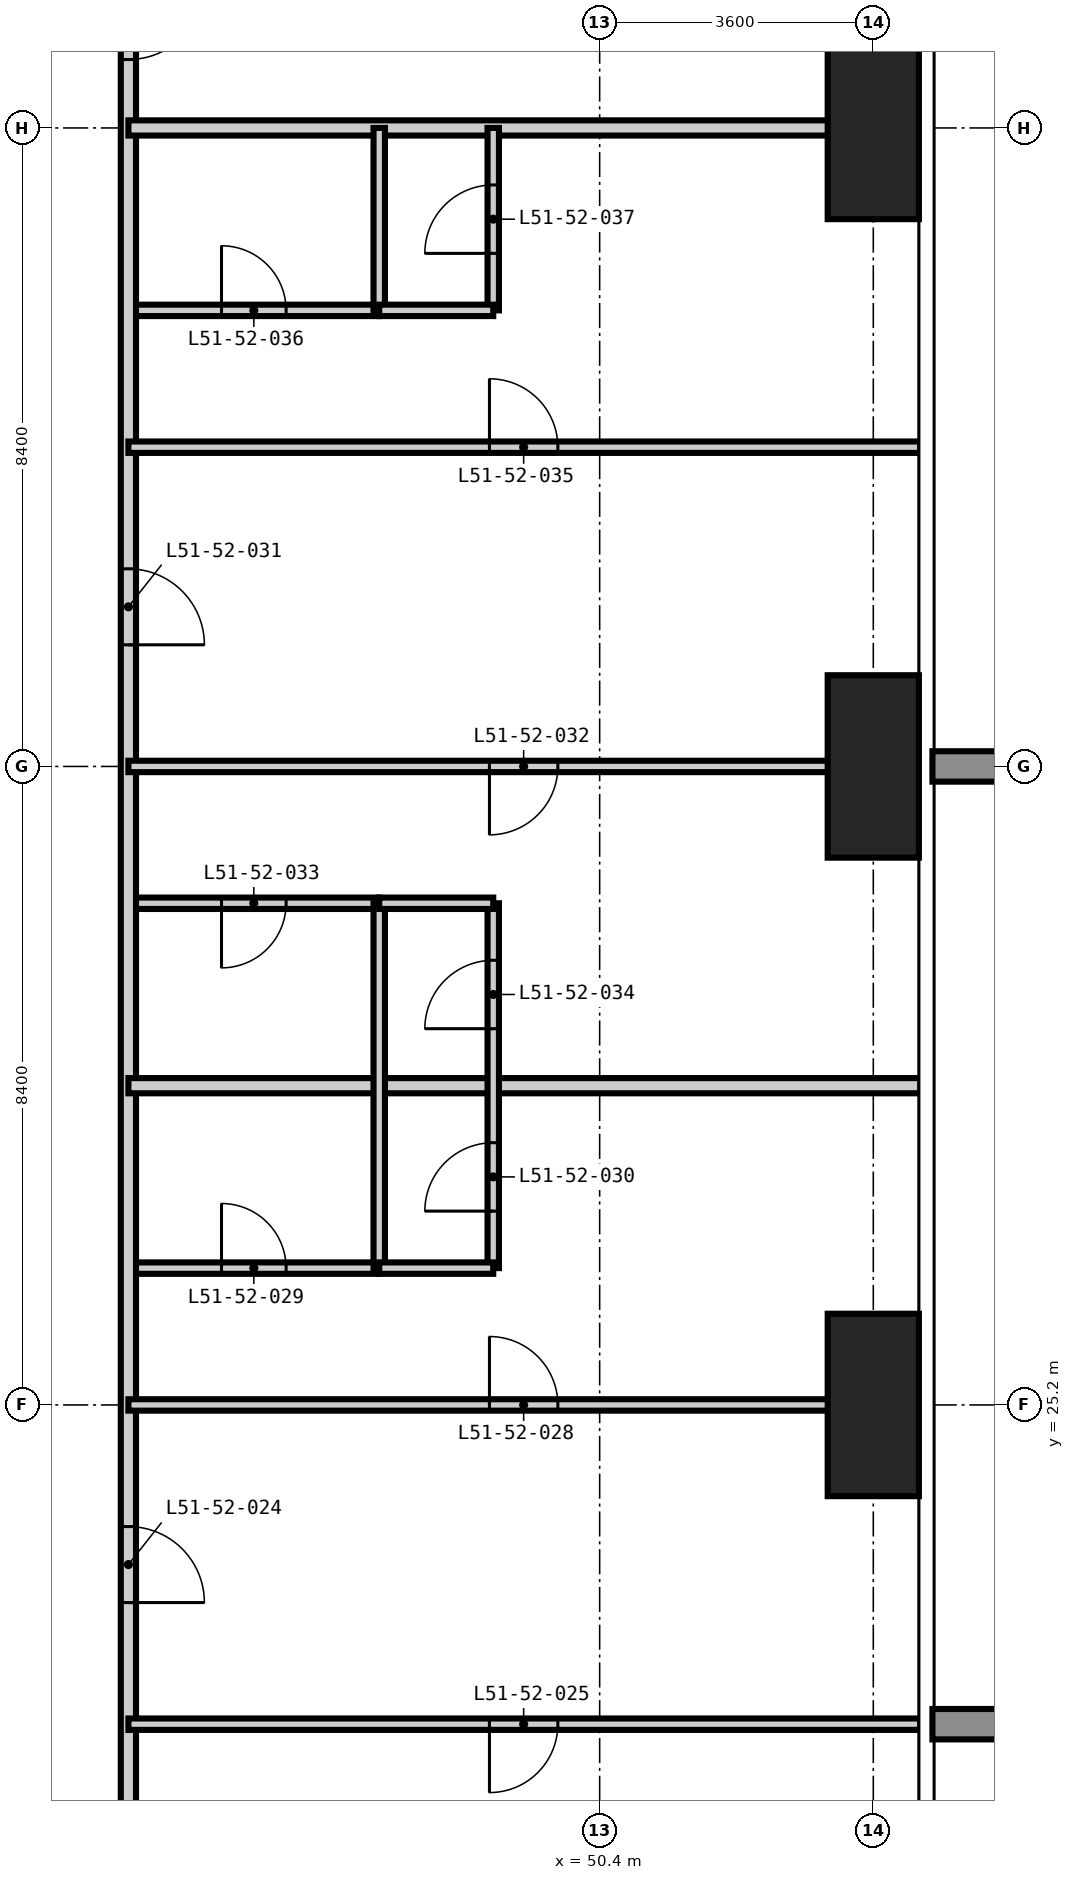
"""IFC4 building model, lengths in metres.
Left out: names, types, materials, properties, quantities, classifications, styles, units other than length and angle.
Written with IfcOpenShell. Run it as: python <this file> out.ifc"""

import sys

from ifc_helpers import new_model, si_unit, direction, frame, frame_2d, origin, origin_2d, place, context, subcontext, project, spatial, rectangle, extrude, element, fill, save


model = new_model("IFC4")
c1 = context("Model", 3, precision=1e-05, world=origin(), true_north=direction((0.0, 1.0)))
c2 = subcontext(c1, "Body", "Model", "MODEL_VIEW")
j1 = project(units=[si_unit("LENGTHUNIT", "METRE"), si_unit("PLANEANGLEUNIT", "RADIAN")], contexts=[c1])
p1 = place(None, origin())
s1 = spatial("IfcSite", under=j1, at=p1, CompositionType="ELEMENT")
p2 = place(p1, origin())
s2 = spatial("IfcBuilding", under=s1, at=p2, CompositionType="ELEMENT")
p3 = place(p2, frame((0.0, 0.0, 198.6)))
s3 = spatial("IfcBuildingStorey", under=s2, at=p3, CompositionType="ELEMENT", Elevation=198.6)
for number, where, z_axis, x_axis in (
    (1, (54.0, 25.2, -0.35), (0.0, 0.0, 1.0), (1.0, 0.0, 0.0)),
    (2, (54.0, 33.6, -0.35), (0.0, 0.0, 1.0), (1.0, 0.0, 0.0)),
    (3, (54.0, 42.0, -0.35), (0.0, 0.0, 1.0), (1.0, 0.0, 0.0)),
):
    element("IfcColumn", number, at=place(p3, frame(where, z_axis=z_axis, x_axis=x_axis)), inside=s3, PredefinedType="COLUMN", context=c2, shape_type="SweptSolid", body=[
        extrude(rectangle(XDim=1.2, YDim=2.4, at=origin_2d()), origin(), (0.0, 0.0, 1.0), 3.6),
    ])
p4 = place(p3, frame((44.2, 27.0, 0.0), z_axis=(0.0, 0.0, 1.0), x_axis=(1.0, 0.0, 0.0)))
e4 = element("IfcWall", 4, at=p4, inside=s3, PredefinedType="PARTITIONING", context=c2, shape_type="SweptSolid", body=[
    extrude(rectangle(XDim=3.3, YDim=0.15, at=frame_2d((1.65, 0.0))), origin(), (0.0, 0.0, 1.0), 3.25),
])
p5 = place(p4, frame((1.225, 0.0, 0.0)))
e5 = element("IfcOpeningElement", 5, at=p5, cuts=e4, PredefinedType="OPENING", context=c2, shape_type="SweptSolid", body=[
    extrude(rectangle(XDim=0.85, YDim=2.1, at=frame_2d((0.425, 1.05))), frame((0.0, 0.085, 0.0), z_axis=(0.0, -1.0, 0.0), x_axis=(1.0, 0.0, 0.0)), (0.0, 0.0, 1.0), 0.17),
])
p6 = place(p3, frame((44.2, 31.8, 0.0), z_axis=(0.0, 0.0, 1.0), x_axis=(1.0, 0.0, 0.0)))
e6 = element("IfcWall", 6, at=p6, inside=s3, PredefinedType="PARTITIONING", context=c2, shape_type="SweptSolid", body=[
    extrude(rectangle(XDim=3.3, YDim=0.15, at=frame_2d((1.65, 0.0))), origin(), (0.0, 0.0, 1.0), 3.25),
])
p7 = place(p6, frame((1.225, 0.0, 0.0)))
e7 = element("IfcOpeningElement", 7, at=p7, cuts=e6, PredefinedType="OPENING", context=c2, shape_type="SweptSolid", body=[
    extrude(rectangle(XDim=0.85, YDim=2.1, at=frame_2d((0.425, 1.05))), frame((0.0, 0.085, 0.0), z_axis=(0.0, -1.0, 0.0), x_axis=(1.0, 0.0, 0.0)), (0.0, 0.0, 1.0), 0.17),
])
p8 = place(p3, frame((44.2, 39.6, 0.0), z_axis=(0.0, 0.0, 1.0), x_axis=(1.0, 0.0, 0.0)))
e8 = element("IfcWall", 8, at=p8, inside=s3, PredefinedType="PARTITIONING", context=c2, shape_type="SweptSolid", body=[
    extrude(rectangle(XDim=3.3, YDim=0.15, at=frame_2d((1.65, 0.0))), origin(), (0.0, 0.0, 1.0), 3.25),
])
p9 = place(p8, frame((1.225, 0.0, 0.0)))
e9 = element("IfcOpeningElement", 9, at=p9, cuts=e8, PredefinedType="OPENING", context=c2, shape_type="SweptSolid", body=[
    extrude(rectangle(XDim=0.85, YDim=2.1, at=frame_2d((0.425, 1.05))), frame((0.0, 0.085, 0.0), z_axis=(0.0, -1.0, 0.0), x_axis=(1.0, 0.0, 0.0)), (0.0, 0.0, 1.0), 0.17),
])
p10 = place(p3, frame((44.2, 44.8, 0.0), z_axis=(0.0, 0.0, 1.0), x_axis=(0.0, -1.0, 0.0)))
e10 = element("IfcWall", 10, at=p10, inside=s3, PredefinedType="PARTITIONING", context=c2, shape_type="SweptSolid", body=[
    extrude(rectangle(XDim=31.4, YDim=0.2, at=frame_2d((15.7, 0.0))), origin(), (0.0, 0.0, 1.0), 3.25),
])
p11 = place(p10, frame((21.2, 0.0, 0.0)))
e11 = element("IfcOpeningElement", 11, at=p11, cuts=e10, PredefinedType="OPENING", context=c2, shape_type="SweptSolid", body=[
    extrude(rectangle(XDim=1.0, YDim=2.2, at=frame_2d((0.5, 1.1))), frame((0.0, 0.11, 0.0), z_axis=(0.0, -1.0, 0.0), x_axis=(1.0, 0.0, 0.0)), (0.0, 0.0, 1.0), 0.22),
])
p12 = place(p10, frame((8.6, 0.0, 0.0)))
e12 = element("IfcOpeningElement", 12, at=p12, cuts=e10, PredefinedType="OPENING", context=c2, shape_type="SweptSolid", body=[
    extrude(rectangle(XDim=1.0, YDim=2.2, at=frame_2d((0.5, 1.1))), frame((0.0, 0.11, 0.0), z_axis=(0.0, -1.0, 0.0), x_axis=(1.0, 0.0, 0.0)), (0.0, 0.0, 1.0), 0.22),
])
p13 = place(p10, frame((29.2, 0.0, 0.0)))
e13 = element("IfcOpeningElement", 13, at=p13, cuts=e10, PredefinedType="OPENING", context=c2, shape_type="SweptSolid", body=[
    extrude(rectangle(XDim=1.0, YDim=2.2, at=frame_2d((0.5, 1.1))), frame((0.0, 0.11, 0.0), z_axis=(0.0, -1.0, 0.0), x_axis=(1.0, 0.0, 0.0)), (0.0, 0.0, 1.0), 0.22),
])
p14 = place(p10, frame((0.9, 0.0, 0.0)))
e14 = element("IfcOpeningElement", 14, at=p14, cuts=e10, PredefinedType="OPENING", context=c2, shape_type="SweptSolid", body=[
    extrude(rectangle(XDim=1.0, YDim=2.2, at=frame_2d((0.5, 1.1))), frame((0.0, 0.11, 0.0), z_axis=(0.0, -1.0, 0.0), x_axis=(1.0, 0.0, 0.0)), (0.0, 0.0, 1.0), 0.22),
])
for number, where, z_axis, x_axis in (
    (15, (44.2, 29.4, 0.0), (0.0, 0.0, 1.0), (1.0, 0.0, 0.0)),
    (16, (44.2, 42.0, 0.0), (0.0, 0.0, 1.0), (1.0, 0.0, 0.0)),
):
    element("IfcWall", number, at=place(p3, frame(where, z_axis=z_axis, x_axis=x_axis)), inside=s3, PredefinedType="PARTITIONING", context=c2, shape_type="SweptSolid", body=[
        extrude(rectangle(XDim=10.418, YDim=0.2, at=frame_2d((5.209, 0.0))), origin(), (0.0, 0.0, 1.0), 3.25),
    ])
p15 = place(p3, frame((47.5, 27.0, 0.0), z_axis=(0.0, 0.0, 1.0), x_axis=(0.0, 1.0, 0.0)))
e17 = element("IfcWall", 17, at=p15, inside=s3, PredefinedType="PARTITIONING", context=c2, shape_type="SweptSolid", body=[
    extrude(rectangle(XDim=4.8, YDim=0.15, at=frame_2d((2.4, 0.0))), origin(), (0.0, 0.0, 1.0), 3.25),
])
p16 = place(p3, frame((47.5, 39.6, 0.0), z_axis=(0.0, 0.0, 1.0), x_axis=(0.0, 1.0, 0.0)))
e18 = element("IfcWall", 18, at=p16, inside=s3, PredefinedType="PARTITIONING", context=c2, shape_type="SweptSolid", body=[
    extrude(rectangle(XDim=2.4, YDim=0.15, at=frame_2d((1.2, 0.0))), origin(), (0.0, 0.0, 1.0), 3.25),
])
p17 = place(p3, frame((49.0, 27.0, 0.0), z_axis=(0.0, 0.0, 1.0), x_axis=(0.0, 1.0, 0.0)))
e19 = element("IfcWall", 19, at=p17, inside=s3, PredefinedType="PARTITIONING", context=c2, shape_type="SweptSolid", body=[
    extrude(rectangle(XDim=4.8, YDim=0.15, at=frame_2d((2.4, 0.0))), origin(), (0.0, 0.0, 1.0), 3.25),
])
p18 = place(p17, frame((0.75, 0.0, 0.0)))
e20 = element("IfcOpeningElement", 20, at=p18, cuts=e19, PredefinedType="OPENING", context=c2, shape_type="SweptSolid", body=[
    extrude(rectangle(XDim=0.9, YDim=2.1, at=frame_2d((0.45, 1.05))), frame((0.0, 0.085, 0.0), z_axis=(0.0, -1.0, 0.0), x_axis=(1.0, 0.0, 0.0)), (0.0, 0.0, 1.0), 0.17),
])
p19 = place(p17, frame((3.15, 0.0, 0.0)))
e21 = element("IfcOpeningElement", 21, at=p19, cuts=e19, PredefinedType="OPENING", context=c2, shape_type="SweptSolid", body=[
    extrude(rectangle(XDim=0.9, YDim=2.1, at=frame_2d((0.45, 1.05))), frame((0.0, 0.085, 0.0), z_axis=(0.0, -1.0, 0.0), x_axis=(1.0, 0.0, 0.0)), (0.0, 0.0, 1.0), 0.17),
])
p20 = place(p3, frame((49.0, 39.6, 0.0), z_axis=(0.0, 0.0, 1.0), x_axis=(0.0, 1.0, 0.0)))
e22 = element("IfcWall", 22, at=p20, inside=s3, PredefinedType="PARTITIONING", context=c2, shape_type="SweptSolid", body=[
    extrude(rectangle(XDim=2.4, YDim=0.15, at=frame_2d((1.2, 0.0))), origin(), (0.0, 0.0, 1.0), 3.25),
])
p21 = place(p20, frame((0.75, 0.0, 0.0)))
e23 = element("IfcOpeningElement", 23, at=p21, cuts=e22, PredefinedType="OPENING", context=c2, shape_type="SweptSolid", body=[
    extrude(rectangle(XDim=0.9, YDim=2.1, at=frame_2d((0.45, 1.05))), frame((0.0, 0.085, 0.0), z_axis=(0.0, -1.0, 0.0), x_axis=(1.0, 0.0, 0.0)), (0.0, 0.0, 1.0), 0.17),
])
p22 = place(p3, frame((44.2, 21.0, 0.0), z_axis=(0.0, 0.0, 1.0), x_axis=(1.0, 0.0, 0.0)))
e24 = element("IfcWall", 24, at=p22, inside=s3, PredefinedType="PARTITIONING", context=c2, shape_type="SweptSolid", body=[
    extrude(rectangle(XDim=10.418, YDim=0.15, at=frame_2d((5.209, 0.0))), origin(), (0.0, 0.0, 1.0), 3.25),
])
p23 = place(p22, frame((4.75, 0.0, 0.0)))
e25 = element("IfcOpeningElement", 25, at=p23, cuts=e24, PredefinedType="OPENING", context=c2, shape_type="SweptSolid", body=[
    extrude(rectangle(XDim=0.9, YDim=2.1, at=frame_2d((0.45, 1.05))), frame((0.0, 0.085, 0.0), z_axis=(0.0, -1.0, 0.0), x_axis=(1.0, 0.0, 0.0)), (0.0, 0.0, 1.0), 0.17),
])
p24 = place(p3, frame((44.2, 25.2, 0.0), z_axis=(0.0, 0.0, 1.0), x_axis=(1.0, 0.0, 0.0)))
e26 = element("IfcWall", 26, at=p24, inside=s3, PredefinedType="PARTITIONING", context=c2, shape_type="SweptSolid", body=[
    extrude(rectangle(XDim=10.418, YDim=0.15, at=frame_2d((5.209, 0.0))), origin(), (0.0, 0.0, 1.0), 3.25),
])
p25 = place(p24, frame((4.75, 0.0, 0.0)))
e27 = element("IfcOpeningElement", 27, at=p25, cuts=e26, PredefinedType="OPENING", context=c2, shape_type="SweptSolid", body=[
    extrude(rectangle(XDim=0.9, YDim=2.1, at=frame_2d((0.45, 1.05))), frame((0.0, 0.085, 0.0), z_axis=(0.0, -1.0, 0.0), x_axis=(1.0, 0.0, 0.0)), (0.0, 0.0, 1.0), 0.17),
])
for number, where, z_axis, x_axis in (
    (28, (47.5, 27.0, 0.0), (0.0, 0.0, 1.0), (1.0, 0.0, 0.0)),
    (29, (47.5, 31.8, 0.0), (0.0, 0.0, 1.0), (1.0, 0.0, 0.0)),
):
    element("IfcWall", number, at=place(p3, frame(where, z_axis=z_axis, x_axis=x_axis)), inside=s3, PredefinedType="PARTITIONING", context=c2, shape_type="SweptSolid", body=[
        extrude(rectangle(XDim=1.5, YDim=0.15, at=frame_2d((0.75, 0.0))), origin(), (0.0, 0.0, 1.0), 3.25),
    ])
p26 = place(p3, frame((44.2, 33.6, 0.0), z_axis=(0.0, 0.0, 1.0), x_axis=(1.0, 0.0, 0.0)))
e30 = element("IfcWall", 30, at=p26, inside=s3, PredefinedType="PARTITIONING", context=c2, shape_type="SweptSolid", body=[
    extrude(rectangle(XDim=10.418, YDim=0.15, at=frame_2d((5.209, 0.0))), origin(), (0.0, 0.0, 1.0), 3.25),
])
p27 = place(p26, frame((4.75, 0.0, 0.0)))
e31 = element("IfcOpeningElement", 31, at=p27, cuts=e30, PredefinedType="OPENING", context=c2, shape_type="SweptSolid", body=[
    extrude(rectangle(XDim=0.9, YDim=2.1, at=frame_2d((0.45, 1.05))), frame((0.0, 0.085, 0.0), z_axis=(0.0, -1.0, 0.0), x_axis=(1.0, 0.0, 0.0)), (0.0, 0.0, 1.0), 0.17),
])
p28 = place(p3, frame((44.2, 37.8, 0.0), z_axis=(0.0, 0.0, 1.0), x_axis=(1.0, 0.0, 0.0)))
e32 = element("IfcWall", 32, at=p28, inside=s3, PredefinedType="PARTITIONING", context=c2, shape_type="SweptSolid", body=[
    extrude(rectangle(XDim=10.418, YDim=0.15, at=frame_2d((5.209, 0.0))), origin(), (0.0, 0.0, 1.0), 3.25),
])
p29 = place(p28, frame((4.75, 0.0, 0.0)))
e33 = element("IfcOpeningElement", 33, at=p29, cuts=e32, PredefinedType="OPENING", context=c2, shape_type="SweptSolid", body=[
    extrude(rectangle(XDim=0.9, YDim=2.1, at=frame_2d((0.45, 1.05))), frame((0.0, 0.085, 0.0), z_axis=(0.0, -1.0, 0.0), x_axis=(1.0, 0.0, 0.0)), (0.0, 0.0, 1.0), 0.17),
])
p30 = place(p3, frame((47.5, 39.6, 0.0), z_axis=(0.0, 0.0, 1.0), x_axis=(1.0, 0.0, 0.0)))
e34 = element("IfcWall", 34, at=p30, inside=s3, PredefinedType="PARTITIONING", context=c2, shape_type="SweptSolid", body=[
    extrude(rectangle(XDim=1.5, YDim=0.15, at=frame_2d((0.75, 0.0))), origin(), (0.0, 0.0, 1.0), 3.25),
])
p31 = place(p11, origin())
e35 = element("IfcDoor", 35, at=p31, inside=s3, OperationType="SINGLE_SWING_RIGHT", PredefinedType="DOOR", context=c2, shape_type="SweptSolid", body=[
    extrude(rectangle(XDim=1.0, YDim=2.2, at=frame_2d((0.5, 1.1))), frame((0.0, 0.025, 0.0), z_axis=(0.0, -1.0, 0.0), x_axis=(1.0, 0.0, 0.0)), (0.0, 0.0, 1.0), 0.05),
])
fill(e11, e35)
p32 = place(p23, frame((0.9, 0.0, 0.0), z_axis=(0.0, 0.0, 1.0), x_axis=(-1.0, 0.0, 0.0)))
e36 = element("IfcDoor", 36, at=p32, inside=s3, OperationType="SINGLE_SWING_RIGHT", PredefinedType="DOOR", context=c2, shape_type="SweptSolid", body=[
    extrude(rectangle(XDim=0.9, YDim=2.1, at=frame_2d((0.45, 1.05))), frame((0.0, 0.025, 0.0), z_axis=(0.0, -1.0, 0.0), x_axis=(1.0, 0.0, 0.0)), (0.0, 0.0, 1.0), 0.05),
])
fill(e25, e36)
p33 = place(p25, origin())
e37 = element("IfcDoor", 37, at=p33, inside=s3, OperationType="SINGLE_SWING_LEFT", PredefinedType="DOOR", context=c2, shape_type="SweptSolid", body=[
    extrude(rectangle(XDim=0.9, YDim=2.1, at=frame_2d((0.45, 1.05))), frame((0.0, 0.025, 0.0), z_axis=(0.0, -1.0, 0.0), x_axis=(1.0, 0.0, 0.0)), (0.0, 0.0, 1.0), 0.05),
])
fill(e27, e37)
p34 = place(p5, origin())
e38 = element("IfcDoor", 38, at=p34, inside=s3, OperationType="SINGLE_SWING_LEFT", PredefinedType="DOOR", context=c2, shape_type="SweptSolid", body=[
    extrude(rectangle(XDim=0.85, YDim=2.1, at=frame_2d((0.425, 1.05))), frame((0.0, 0.025, 0.0), z_axis=(0.0, -1.0, 0.0), x_axis=(1.0, 0.0, 0.0)), (0.0, 0.0, 1.0), 0.05),
])
fill(e5, e38)
p35 = place(p18, origin())
e39 = element("IfcDoor", 39, at=p35, inside=s3, OperationType="SINGLE_SWING_LEFT", PredefinedType="DOOR", context=c2, shape_type="SweptSolid", body=[
    extrude(rectangle(XDim=0.9, YDim=2.1, at=frame_2d((0.45, 1.05))), frame((0.0, 0.025, 0.0), z_axis=(0.0, -1.0, 0.0), x_axis=(1.0, 0.0, 0.0)), (0.0, 0.0, 1.0), 0.05),
])
fill(e20, e39)
p36 = place(p12, origin())
e40 = element("IfcDoor", 40, at=p36, inside=s3, OperationType="SINGLE_SWING_RIGHT", PredefinedType="DOOR", context=c2, shape_type="SweptSolid", body=[
    extrude(rectangle(XDim=1.0, YDim=2.2, at=frame_2d((0.5, 1.1))), frame((0.0, 0.025, 0.0), z_axis=(0.0, -1.0, 0.0), x_axis=(1.0, 0.0, 0.0)), (0.0, 0.0, 1.0), 0.05),
])
fill(e12, e40)
p37 = place(p27, frame((0.9, 0.0, 0.0), z_axis=(0.0, 0.0, 1.0), x_axis=(-1.0, 0.0, 0.0)))
e41 = element("IfcDoor", 41, at=p37, inside=s3, OperationType="SINGLE_SWING_RIGHT", PredefinedType="DOOR", context=c2, shape_type="SweptSolid", body=[
    extrude(rectangle(XDim=0.9, YDim=2.1, at=frame_2d((0.45, 1.05))), frame((0.0, 0.025, 0.0), z_axis=(0.0, -1.0, 0.0), x_axis=(1.0, 0.0, 0.0)), (0.0, 0.0, 1.0), 0.05),
])
fill(e31, e41)
p38 = place(p7, frame((0.85, 0.0, 0.0), z_axis=(0.0, 0.0, 1.0), x_axis=(-1.0, 0.0, 0.0)))
e42 = element("IfcDoor", 42, at=p38, inside=s3, OperationType="SINGLE_SWING_RIGHT", PredefinedType="DOOR", context=c2, shape_type="SweptSolid", body=[
    extrude(rectangle(XDim=0.85, YDim=2.1, at=frame_2d((0.425, 1.05))), frame((0.0, 0.025, 0.0), z_axis=(0.0, -1.0, 0.0), x_axis=(1.0, 0.0, 0.0)), (0.0, 0.0, 1.0), 0.05),
])
fill(e7, e42)
p39 = place(p19, origin())
e43 = element("IfcDoor", 43, at=p39, inside=s3, OperationType="SINGLE_SWING_LEFT", PredefinedType="DOOR", context=c2, shape_type="SweptSolid", body=[
    extrude(rectangle(XDim=0.9, YDim=2.1, at=frame_2d((0.45, 1.05))), frame((0.0, 0.025, 0.0), z_axis=(0.0, -1.0, 0.0), x_axis=(1.0, 0.0, 0.0)), (0.0, 0.0, 1.0), 0.05),
])
fill(e21, e43)
p40 = place(p29, origin())
e44 = element("IfcDoor", 44, at=p40, inside=s3, OperationType="SINGLE_SWING_LEFT", PredefinedType="DOOR", context=c2, shape_type="SweptSolid", body=[
    extrude(rectangle(XDim=0.9, YDim=2.1, at=frame_2d((0.45, 1.05))), frame((0.0, 0.025, 0.0), z_axis=(0.0, -1.0, 0.0), x_axis=(1.0, 0.0, 0.0)), (0.0, 0.0, 1.0), 0.05),
])
fill(e33, e44)
p41 = place(p9, origin())
e45 = element("IfcDoor", 45, at=p41, inside=s3, OperationType="SINGLE_SWING_LEFT", PredefinedType="DOOR", context=c2, shape_type="SweptSolid", body=[
    extrude(rectangle(XDim=0.85, YDim=2.1, at=frame_2d((0.425, 1.05))), frame((0.0, 0.025, 0.0), z_axis=(0.0, -1.0, 0.0), x_axis=(1.0, 0.0, 0.0)), (0.0, 0.0, 1.0), 0.05),
])
fill(e9, e45)
p42 = place(p21, origin())
e46 = element("IfcDoor", 46, at=p42, inside=s3, OperationType="SINGLE_SWING_LEFT", PredefinedType="DOOR", context=c2, shape_type="SweptSolid", body=[
    extrude(rectangle(XDim=0.9, YDim=2.1, at=frame_2d((0.45, 1.05))), frame((0.0, 0.025, 0.0), z_axis=(0.0, -1.0, 0.0), x_axis=(1.0, 0.0, 0.0)), (0.0, 0.0, 1.0), 0.05),
])
fill(e23, e46)
p43 = place(p14, origin())
e47 = element("IfcDoor", 47, at=p43, inside=s3, OperationType="SINGLE_SWING_LEFT", PredefinedType="DOOR", context=c2, shape_type="SweptSolid", body=[
    extrude(rectangle(XDim=1.0, YDim=2.2, at=frame_2d((0.5, 1.1))), frame((0.0, 0.025, 0.0), z_axis=(0.0, -1.0, 0.0), x_axis=(1.0, 0.0, 0.0)), (0.0, 0.0, 1.0), 0.05),
])
fill(e14, e47)
save(model, sys.argv[1])
